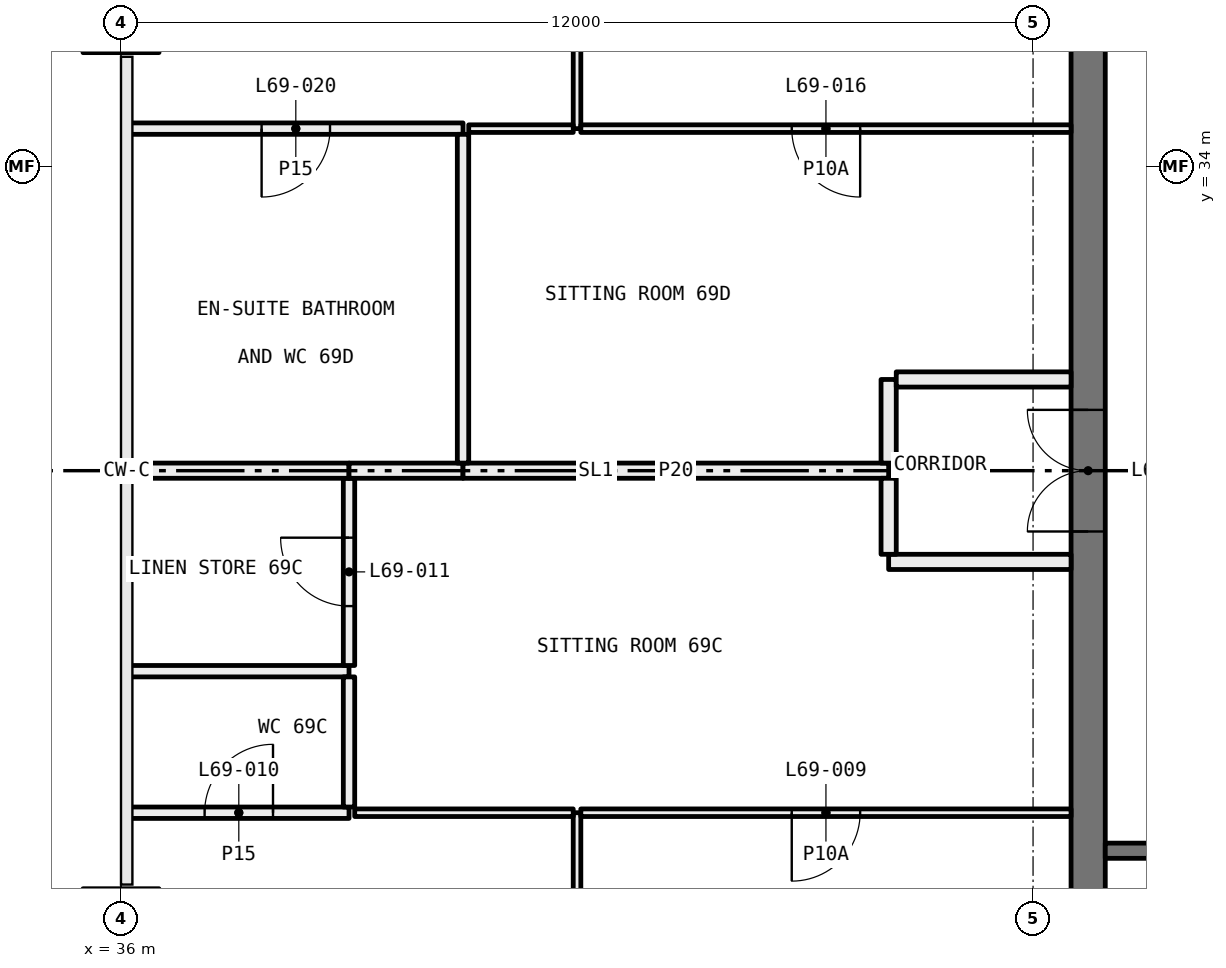
"""IFC4 building model, lengths in metres.
Left out: names, types, materials, properties, quantities, classifications, styles, units other than length and angle.
Written with IfcOpenShell. Run it as: python <this file> out.ifc"""

import sys

from ifc_helpers import new_model, si_unit, direction, frame, frame_2d, origin, place, context, subcontext, project, spatial, rectangle, extrude, element, fill, save


model = new_model("IFC4")
c1 = context("Model", 3, precision=1e-05, world=origin(), true_north=direction((0.0, 1.0)))
c2 = subcontext(c1, "Body", "Model", "MODEL_VIEW")
j1 = project(units=[si_unit("LENGTHUNIT", "METRE"), si_unit("PLANEANGLEUNIT", "RADIAN")], contexts=[c1])
p1 = place(None, origin())
s1 = spatial("IfcSite", under=j1, at=p1, CompositionType="ELEMENT")
p2 = place(p1, origin())
s2 = spatial("IfcBuilding", under=s1, at=p2, CompositionType="ELEMENT")
p3 = place(p2, frame((0.0, 0.0, 255.9)))
s3 = spatial("IfcBuildingStorey", under=s2, at=p3, CompositionType="ELEMENT", Elevation=255.9)
p4 = place(p3, frame((42.0, 24.1, 0.0), z_axis=(0.0, 0.0, 1.0), x_axis=(0.0, 1.0, 0.0)))
e1 = element("IfcWall", 1, at=p4, inside=s3, PredefinedType="PARTITIONING", context=c2, shape_type="SweptSolid", body=[
    extrude(rectangle(XDim=1.4, YDim=0.1, at=frame_2d((0.7, 0.0))), origin(), (0.0, 0.0, 1.0), 3.05),
])
p5 = place(p3, frame((39.0, 25.5, 0.0), z_axis=(0.0, 0.0, 1.0), x_axis=(-1.0, 0.0, 0.0)))
e2 = element("IfcWall", 2, at=p5, inside=s3, PredefinedType="PARTITIONING", context=c2, shape_type="SweptSolid", body=[
    extrude(rectangle(XDim=2.9, YDim=0.15, at=frame_2d((1.45, 0.0))), origin(), (0.0, 0.0, 1.0), 3.05),
])
p6 = place(p5, frame((1.0, 0.0, 0.0)))
e3 = element("IfcOpeningElement", 3, at=p6, cuts=e2, PredefinedType="OPENING", context=c2, shape_type="SweptSolid", body=[
    extrude(rectangle(XDim=0.9, YDim=2.1, at=frame_2d((0.45, 1.05))), frame((0.0, 0.085, 0.0), z_axis=(0.0, -1.0, 0.0), x_axis=(1.0, 0.0, 0.0)), (0.0, 0.0, 1.0), 0.17),
])
p7 = place(p3, frame((41.95, 25.5, 0.0), z_axis=(0.0, 0.0, 1.0), x_axis=(-1.0, 0.0, 0.0)))
e4 = element("IfcWall", 4, at=p7, inside=s3, PredefinedType="PARTITIONING", context=c2, shape_type="SweptSolid", body=[
    extrude(rectangle(XDim=2.875, YDim=0.1, at=frame_2d((1.438, 0.0))), origin(), (0.0, 0.0, 1.0), 3.05),
])
p8 = place(p3, frame((48.5, 25.5, 0.0), z_axis=(0.0, 0.0, 1.0), x_axis=(-1.0, 0.0, 0.0)))
e5 = element("IfcWall", 5, at=p8, inside=s3, PredefinedType="PARTITIONING", context=c2, shape_type="SweptSolid", body=[
    extrude(rectangle(XDim=6.45, YDim=0.1, at=frame_2d((3.225, 0.0))), origin(), (0.0, 0.0, 1.0), 3.05),
])
p9 = place(p8, frame((2.775, 0.0, 0.0)))
e6 = element("IfcOpeningElement", 6, at=p9, cuts=e5, PredefinedType="OPENING", context=c2, shape_type="SweptSolid", body=[
    extrude(rectangle(XDim=0.9, YDim=2.1, at=frame_2d((0.45, 1.05))), frame((0.0, 0.06, 0.0), z_axis=(0.0, -1.0, 0.0), x_axis=(1.0, 0.0, 0.0)), (0.0, 0.0, 1.0), 0.12),
])
p10 = place(p3, frame((39.0, 27.362, 0.0), z_axis=(0.0, 0.0, 1.0), x_axis=(-1.0, 0.0, 0.0)))
e7 = element("IfcWall", 7, at=p10, inside=s3, PredefinedType="PARTITIONING", context=c2, shape_type="SweptSolid", body=[
    extrude(rectangle(XDim=2.9, YDim=0.15, at=frame_2d((1.45, 0.0))), origin(), (0.0, 0.0, 1.0), 3.05),
])
p11 = place(p3, frame((39.0, 25.575, 0.0), z_axis=(0.0, 0.0, 1.0), x_axis=(0.0, 1.0, 0.0)))
e8 = element("IfcWall", 8, at=p11, inside=s3, PredefinedType="PARTITIONING", context=c2, shape_type="SweptSolid", body=[
    extrude(rectangle(XDim=1.712, YDim=0.15, at=frame_2d((0.856, 0.0))), origin(), (0.0, 0.0, 1.0), 3.05),
])
p12 = place(p3, frame((39.0, 27.437, 0.0), z_axis=(0.0, 0.0, 1.0), x_axis=(0.0, 1.0, 0.0)))
e9 = element("IfcWall", 9, at=p12, inside=s3, PredefinedType="PARTITIONING", context=c2, shape_type="SweptSolid", body=[
    extrude(rectangle(XDim=2.463, YDim=0.15, at=frame_2d((1.231, 0.0))), origin(), (0.0, 0.0, 1.0), 3.05),
])
p13 = place(p12, frame((0.781, 0.0, 0.0)))
e10 = element("IfcOpeningElement", 10, at=p13, cuts=e9, PredefinedType="OPENING", context=c2, shape_type="SweptSolid", body=[
    extrude(rectangle(XDim=0.9, YDim=2.1, at=frame_2d((0.45, 1.05))), frame((0.0, 0.085, 0.0), z_axis=(0.0, -1.0, 0.0), x_axis=(1.0, 0.0, 0.0)), (0.0, 0.0, 1.0), 0.17),
])
p14 = place(p3, frame((39.0, 30.0, 0.0), z_axis=(0.0, 0.0, 1.0), x_axis=(-1.0, 0.0, 0.0)))
e11 = element("IfcWall", 11, at=p14, inside=s3, PredefinedType="PARTITIONING", context=c2, shape_type="SweptSolid", body=[
    extrude(rectangle(XDim=2.9, YDim=0.2, at=frame_2d((1.45, 0.0))), origin(), (0.0, 0.0, 1.0), 3.05),
])
p15 = place(p3, frame((40.5, 30.0, 0.0), z_axis=(0.0, 0.0, 1.0), x_axis=(-1.0, 0.0, 0.0)))
e12 = element("IfcWall", 12, at=p15, inside=s3, PredefinedType="PARTITIONING", context=c2, shape_type="SweptSolid", body=[
    extrude(rectangle(XDim=1.5, YDim=0.2, at=frame_2d((0.75, 0.0))), origin(), (0.0, 0.0, 1.0), 3.05),
])
p16 = place(p3, frame((46.1, 30.0, 0.0), z_axis=(0.0, 0.0, 1.0), x_axis=(-1.0, 0.0, 0.0)))
e13 = element("IfcWall", 13, at=p16, inside=s3, PredefinedType="PARTITIONING", context=c2, shape_type="SweptSolid", body=[
    extrude(rectangle(XDim=5.6, YDim=0.2, at=frame_2d((2.8, 0.0))), origin(), (0.0, 0.0, 1.0), 3.05),
])
p17 = place(p3, frame((48.5, 28.8, 0.0), z_axis=(0.0, 0.0, 1.0), x_axis=(-1.0, 0.0, 0.0)))
e14 = element("IfcWall", 14, at=p17, inside=s3, PredefinedType="PARTITIONING", context=c2, shape_type="SweptSolid", body=[
    extrude(rectangle(XDim=2.4, YDim=0.2, at=frame_2d((1.2, 0.0))), origin(), (0.0, 0.0, 1.0), 3.05),
])
p18 = place(p3, frame((46.1, 28.9, 0.0), z_axis=(0.0, 0.0, 1.0), x_axis=(0.0, 1.0, 0.0)))
e15 = element("IfcWall", 15, at=p18, inside=s3, PredefinedType="PARTITIONING", context=c2, shape_type="SweptSolid", body=[
    extrude(rectangle(XDim=1.0, YDim=0.2, at=frame_2d((0.5, 0.0))), origin(), (0.0, 0.0, 1.0), 3.05),
])
p19 = place(p3, frame((42.0, 34.5, 0.0), z_axis=(0.0, 0.0, 1.0), x_axis=(0.0, 1.0, 0.0)))
e16 = element("IfcWall", 16, at=p19, inside=s3, PredefinedType="PARTITIONING", context=c2, shape_type="SweptSolid", body=[
    extrude(rectangle(XDim=1.6, YDim=0.1, at=frame_2d((0.8, 0.0))), origin(), (0.0, 0.0, 1.0), 2.45),
])
p20 = place(p3, frame((36.1, 34.5, 0.0), z_axis=(0.0, 0.0, 1.0), x_axis=(1.0, 0.0, 0.0)))
e17 = element("IfcWall", 17, at=p20, inside=s3, PredefinedType="PARTITIONING", context=c2, shape_type="SweptSolid", body=[
    extrude(rectangle(XDim=4.4, YDim=0.15, at=frame_2d((2.2, 0.0))), origin(), (0.0, 0.0, 1.0), 3.05),
])
p21 = place(p20, frame((1.75, 0.0, 0.0)))
e18 = element("IfcOpeningElement", 18, at=p21, cuts=e17, PredefinedType="OPENING", context=c2, shape_type="SweptSolid", body=[
    extrude(rectangle(XDim=0.9, YDim=2.1, at=frame_2d((0.45, 1.05))), frame((0.0, 0.085, 0.0), z_axis=(0.0, -1.0, 0.0), x_axis=(1.0, 0.0, 0.0)), (0.0, 0.0, 1.0), 0.17),
])
p22 = place(p3, frame((40.575, 34.5, 0.0), z_axis=(0.0, 0.0, 1.0), x_axis=(1.0, 0.0, 0.0)))
e19 = element("IfcWall", 19, at=p22, inside=s3, PredefinedType="PARTITIONING", context=c2, shape_type="SweptSolid", body=[
    extrude(rectangle(XDim=1.375, YDim=0.1, at=frame_2d((0.688, 0.0))), origin(), (0.0, 0.0, 1.0), 3.05),
])
p23 = place(p3, frame((42.05, 34.5, 0.0), z_axis=(0.0, 0.0, 1.0), x_axis=(1.0, 0.0, 0.0)))
e20 = element("IfcWall", 20, at=p23, inside=s3, PredefinedType="PARTITIONING", context=c2, shape_type="SweptSolid", body=[
    extrude(rectangle(XDim=6.45, YDim=0.1, at=frame_2d((3.225, 0.0))), origin(), (0.0, 0.0, 1.0), 3.05),
])
p24 = place(p23, frame((2.775, 0.0, 0.0)))
e21 = element("IfcOpeningElement", 21, at=p24, cuts=e20, PredefinedType="OPENING", context=c2, shape_type="SweptSolid", body=[
    extrude(rectangle(XDim=0.9, YDim=2.1, at=frame_2d((0.45, 1.05))), frame((0.0, 0.06, 0.0), z_axis=(0.0, -1.0, 0.0), x_axis=(1.0, 0.0, 0.0)), (0.0, 0.0, 1.0), 0.12),
])
p25 = place(p3, frame((40.5, 30.1, 0.0), z_axis=(0.0, 0.0, 1.0), x_axis=(0.0, 1.0, 0.0)))
e22 = element("IfcWall", 22, at=p25, inside=s3, PredefinedType="PARTITIONING", context=c2, shape_type="SweptSolid", body=[
    extrude(rectangle(XDim=4.325, YDim=0.15, at=frame_2d((2.163, 0.0))), origin(), (0.0, 0.0, 1.0), 3.05),
])
p26 = place(p3, frame((46.1, 30.1, 0.0), z_axis=(0.0, 0.0, 1.0), x_axis=(0.0, 1.0, 0.0)))
e23 = element("IfcWall", 23, at=p26, inside=s3, PredefinedType="PARTITIONING", context=c2, shape_type="SweptSolid", body=[
    extrude(rectangle(XDim=1.1, YDim=0.2, at=frame_2d((0.55, 0.0))), origin(), (0.0, 0.0, 1.0), 3.05),
])
p27 = place(p3, frame((46.2, 31.2, 0.0), z_axis=(0.0, 0.0, 1.0), x_axis=(1.0, 0.0, 0.0)))
e24 = element("IfcWall", 24, at=p27, inside=s3, PredefinedType="PARTITIONING", context=c2, shape_type="SweptSolid", body=[
    extrude(rectangle(XDim=2.3, YDim=0.2, at=frame_2d((1.15, 0.0))), origin(), (0.0, 0.0, 1.0), 3.05),
])
p28 = place(p3, frame((48.725, 21.95, 0.0), z_axis=(0.0, 0.0, 1.0), x_axis=(0.0, 1.0, 0.0)))
e25 = element("IfcWall", 25, at=p28, inside=s3, PredefinedType="SHEAR", context=c2, shape_type="SweptSolid", body=[
    extrude(rectangle(XDim=16.1, YDim=0.45, at=frame_2d((8.05, 0.0))), origin(), (0.0, 0.0, 1.0), 3.05),
])
p29 = place(p28, frame((7.25, 0.0, 0.0)))
e26 = element("IfcOpeningElement", 26, at=p29, cuts=e25, PredefinedType="OPENING", context=c2, shape_type="SweptSolid", body=[
    extrude(rectangle(XDim=1.6, YDim=2.1, at=frame_2d((0.8, 1.05))), frame((0.0, 0.235, 0.0), z_axis=(0.0, -1.0, 0.0), x_axis=(1.0, 0.0, 0.0)), (0.0, 0.0, 1.0), 0.47),
])
p30 = place(p3, frame((56.5, 25.0, 0.0), z_axis=(0.0, 0.0, 1.0), x_axis=(-1.0, 0.0, 0.0)))
e27 = element("IfcWall", 27, at=p30, inside=s3, PredefinedType="SOLIDWALL", context=c2, shape_type="SweptSolid", body=[
    extrude(rectangle(XDim=7.55, YDim=0.2, at=frame_2d((3.775, 0.0))), origin(), (0.0, 0.0, 1.0), 3.05),
])
p31 = place(p9, origin())
e28 = element("IfcDoor", 28, at=p31, inside=s3, OperationType="SINGLE_SWING_LEFT", PredefinedType="DOOR", context=c2, shape_type="SweptSolid", body=[
    extrude(rectangle(XDim=0.9, YDim=2.1, at=frame_2d((0.45, 1.05))), frame((0.0, 0.025, 0.0), z_axis=(0.0, -1.0, 0.0), x_axis=(1.0, 0.0, 0.0)), (0.0, 0.0, 1.0), 0.05),
])
fill(e6, e28)
p32 = place(p6, frame((0.9, 0.0, 0.0), x_axis=(-1.0, 0.0, 0.0)))
e29 = element("IfcDoor", 29, at=p32, inside=s3, OperationType="SINGLE_SWING_LEFT", PredefinedType="DOOR", context=c2, shape_type="SweptSolid", body=[
    extrude(rectangle(XDim=0.9, YDim=2.1, at=frame_2d((0.45, 1.05))), frame((0.0, 0.025, 0.0), z_axis=(0.0, -1.0, 0.0), x_axis=(1.0, 0.0, 0.0)), (0.0, 0.0, 1.0), 0.05),
])
fill(e3, e29)
p33 = place(p13, origin())
e30 = element("IfcDoor", 30, at=p33, inside=s3, OperationType="SINGLE_SWING_LEFT", PredefinedType="DOOR", context=c2, shape_type="SweptSolid", body=[
    extrude(rectangle(XDim=0.9, YDim=2.1, at=frame_2d((0.45, 1.05))), frame((0.0, 0.025, 0.0), z_axis=(0.0, -1.0, 0.0), x_axis=(1.0, 0.0, 0.0)), (0.0, 0.0, 1.0), 0.05),
])
fill(e10, e30)
p34 = place(p24, frame((0.9, 0.0, 0.0), x_axis=(-1.0, 0.0, 0.0)))
e31 = element("IfcDoor", 31, at=p34, inside=s3, OperationType="SINGLE_SWING_RIGHT", PredefinedType="DOOR", context=c2, shape_type="SweptSolid", body=[
    extrude(rectangle(XDim=0.9, YDim=2.1, at=frame_2d((0.45, 1.05))), frame((0.0, 0.025, 0.0), z_axis=(0.0, -1.0, 0.0), x_axis=(1.0, 0.0, 0.0)), (0.0, 0.0, 1.0), 0.05),
])
fill(e21, e31)
p35 = place(p21, frame((0.9, 0.0, 0.0), x_axis=(-1.0, 0.0, 0.0)))
e32 = element("IfcDoor", 32, at=p35, inside=s3, OperationType="SINGLE_SWING_LEFT", PredefinedType="DOOR", context=c2, shape_type="SweptSolid", body=[
    extrude(rectangle(XDim=0.9, YDim=2.1, at=frame_2d((0.45, 1.05))), frame((0.0, 0.025, 0.0), z_axis=(0.0, -1.0, 0.0), x_axis=(1.0, 0.0, 0.0)), (0.0, 0.0, 1.0), 0.05),
])
fill(e18, e32)
p36 = place(p29, origin())
e33 = element("IfcDoor", 33, at=p36, inside=s3, OperationType="DOUBLE_DOOR_SINGLE_SWING", PredefinedType="DOOR", context=c2, shape_type="SweptSolid", body=[
    extrude(rectangle(XDim=1.6, YDim=2.1, at=frame_2d((0.8, 1.05))), frame((0.0, 0.025, 0.0), z_axis=(0.0, -1.0, 0.0), x_axis=(1.0, 0.0, 0.0)), (0.0, 0.0, 1.0), 0.05),
])
fill(e26, e33)
save(model, sys.argv[1])
